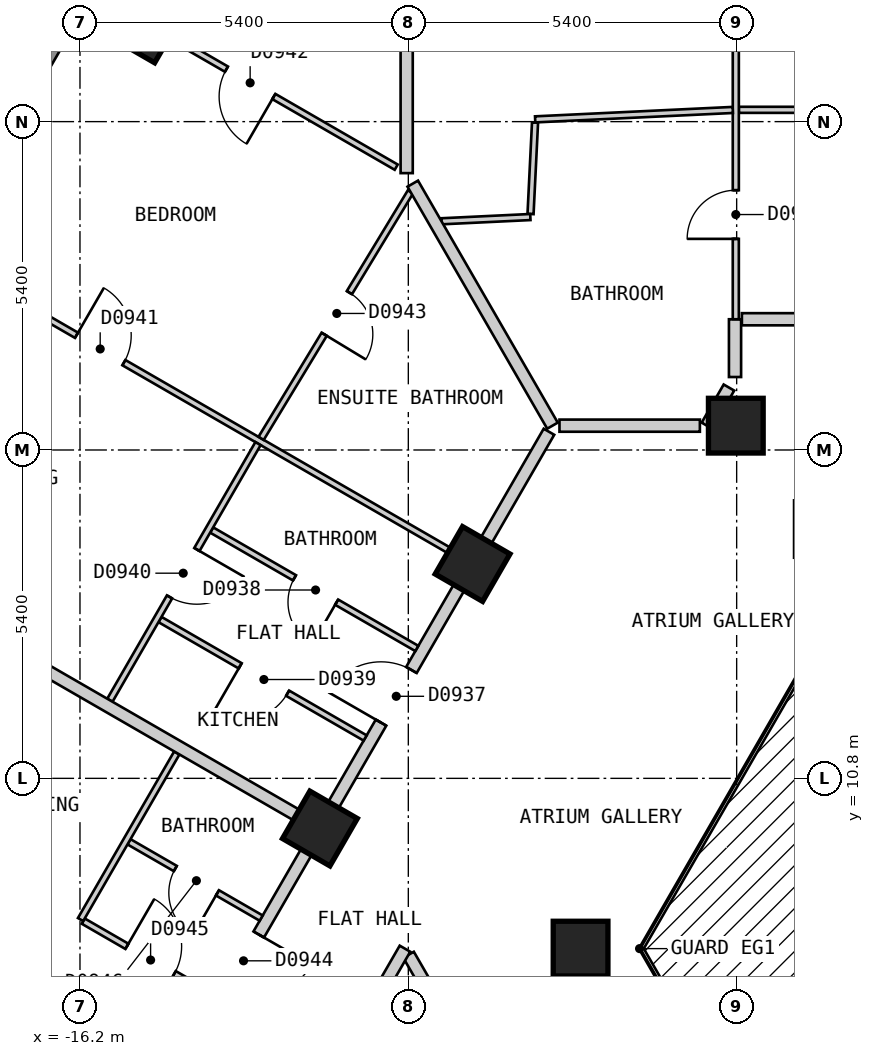
"""IFC4 building model, lengths in metres.
Left out: names, types, materials, properties, quantities, classifications, styles, units other than length and angle.
Written with IfcOpenShell. Run it as: python <this file> out.ifc"""

import sys

from ifc_helpers import new_model, si_unit, direction, frame, frame_2d, origin, origin_2d, place, context, subcontext, project, spatial, polyline, rectangle, outline, extrude, element, fill, save


model = new_model("IFC4")
c1 = context("Model", 3, precision=1e-05, world=origin(), true_north=direction((0.0, 1.0)))
c2 = subcontext(c1, "Body", "Model", "MODEL_VIEW")
j1 = project(units=[si_unit("LENGTHUNIT", "METRE"), si_unit("PLANEANGLEUNIT", "RADIAN")], contexts=[c1])
p1 = place(None, origin())
s1 = spatial("IfcSite", under=j1, at=p1, CompositionType="ELEMENT")
p2 = place(p1, origin())
s2 = spatial("IfcBuilding", under=s1, at=p2, CompositionType="ELEMENT")
p3 = place(p2, frame((0.0, 0.0, 90.0)))
s3 = spatial("IfcBuildingStorey", under=s2, at=p3, CompositionType="ELEMENT", Elevation=90.0)
p4 = place(p3, frame((-15.155, 23.251, 0.0), z_axis=(0.0, 0.0, 1.0), x_axis=(-0.5, -0.866025403784, 0.0)))
e1 = element("IfcColumn", 1, at=p4, inside=s3, PredefinedType="COLUMN", context=c2, shape_type="SweptSolid", body=[
    extrude(rectangle(XDim=1.0, YDim=1.0, at=origin_2d()), origin(), (0.0, 0.0, 1.0), 3.0),
])
for number, where, z_axis, x_axis in (
    (2, (-5.414, 16.6, 0.0), (0.0, 0.0, 1.0), (-1.0, 0.0, 0.0)),
    (3, (-9.743, 14.325, 0.0), (0.0, 0.0, 1.0), (-0.5, -0.866, 0.0)),
    (4, (-7.967, 8.0, 0.0), (0.0, 0.0, 1.0), (1.0, 0.0, 0.0)),
    (5, (-12.254, 9.975, 0.0), (0.0, 0.0, 1.0), (-0.5, -0.866, 0.0)),
):
    element("IfcColumn", number, at=place(p3, frame(where, z_axis=z_axis, x_axis=x_axis)), inside=s3, PredefinedType="COLUMN", context=c2, shape_type="SweptSolid", body=[
        extrude(rectangle(XDim=0.9, YDim=0.9, at=origin_2d()), origin(), (0.0, 0.0, 1.0), 3.0),
    ])
p5 = place(p3, frame((-15.747, 24.425, 0.0), z_axis=(0.0, 0.0, 1.0), x_axis=(-0.500027479704, -0.866009537788, 0.0)))
e6 = element("IfcWall", 6, at=p5, inside=s3, PredefinedType="SOLIDWALL", context=c2, shape_type="SweptSolid", body=[
    extrude(outline(polyline([(0.0, -0.15), (26.559, -0.15), (26.478, 0.15), (0.08, 0.15), (0.0, -0.15)])), origin(), (0.0, 0.0, 1.0), 2.7),
])
p6 = place(p5, frame((2.483, 0.0, 0.15)))
e7 = element("IfcOpeningElement", 7, at=p6, cuts=e6, PredefinedType="OPENING", context=c2, shape_type="SweptSolid", body=[
    extrude(rectangle(XDim=1.5, YDim=2.1, at=frame_2d((0.75, 1.05))), frame((0.0, 0.16, 0.0), z_axis=(0.0, -1.0, 0.0), x_axis=(1.0, 0.0, 0.0)), (0.0, 0.0, 1.0), 0.32),
])
p7 = place(p5, frame((7.506, 0.0, 0.15)))
e8 = element("IfcOpeningElement", 8, at=p7, cuts=e6, PredefinedType="OPENING", context=c2, shape_type="SweptSolid", body=[
    extrude(rectangle(XDim=1.5, YDim=2.1, at=frame_2d((0.75, 1.05))), frame((0.0, 0.16, 0.0), z_axis=(0.0, -1.0, 0.0), x_axis=(1.0, 0.0, 0.0)), (0.0, 0.0, 1.0), 0.32),
])
p8 = place(p5, frame((12.529, 0.0, 0.15)))
e9 = element("IfcOpeningElement", 9, at=p8, cuts=e6, PredefinedType="OPENING", context=c2, shape_type="SweptSolid", body=[
    extrude(rectangle(XDim=1.5, YDim=2.1, at=frame_2d((0.75, 1.05))), frame((0.0, 0.16, 0.0), z_axis=(0.0, -1.0, 0.0), x_axis=(1.0, 0.0, 0.0)), (0.0, 0.0, 1.0), 0.32),
])
p9 = place(p5, frame((17.552, 0.0, 0.15)))
e10 = element("IfcOpeningElement", 10, at=p9, cuts=e6, PredefinedType="OPENING", context=c2, shape_type="SweptSolid", body=[
    extrude(rectangle(XDim=1.5, YDim=2.1, at=frame_2d((0.75, 1.05))), frame((0.0, 0.16, 0.0), z_axis=(0.0, -1.0, 0.0), x_axis=(1.0, 0.0, 0.0)), (0.0, 0.0, 1.0), 0.32),
])
p10 = place(p5, frame((22.575, 0.0, 0.15)))
e11 = element("IfcOpeningElement", 11, at=p10, cuts=e6, PredefinedType="OPENING", context=c2, shape_type="SweptSolid", body=[
    extrude(rectangle(XDim=1.5, YDim=2.1, at=frame_2d((0.75, 1.05))), frame((0.0, 0.16, 0.0), z_axis=(0.0, -1.0, 0.0), x_axis=(1.0, 0.0, 0.0)), (0.0, 0.0, 1.0), 0.32),
])
p11 = place(p3, frame((-10.796, 7.899, 0.0), z_axis=(0.0, 0.0, 1.0), x_axis=(0.500010383074, -0.866019409031, 0.0)))
e12 = element("IfcWall", 12, at=p11, inside=s3, PredefinedType="PARTITIONING", context=c2, shape_type="SweptSolid", body=[
    extrude(rectangle(XDim=7.535, YDim=0.2, at=frame_2d((3.768, 0.0))), origin(), (0.0, 0.0, 1.0), 2.7),
])
p12 = place(p3, frame((-8.314, 16.6, 0.0), z_axis=(0.0, 0.0, 1.0), x_axis=(1.0, 0.0, 0.0)))
e13 = element("IfcWall", 13, at=p12, inside=s3, PredefinedType="PARTITIONING", context=c2, shape_type="SweptSolid", body=[
    extrude(rectangle(XDim=2.309, YDim=0.2, at=frame_2d((1.155, 0.0))), origin(), (0.0, 0.0, 1.0), 2.7),
])
p13 = place(p3, frame((-5.314, 18.35, 0.0), z_axis=(0.0, 0.0, 1.0), x_axis=(1.0, 0.0, 0.0)))
e14 = element("IfcWall", 14, at=p13, inside=s3, PredefinedType="PARTITIONING", context=c2, shape_type="SweptSolid", body=[
    extrude(rectangle(XDim=7.063, YDim=0.2, at=frame_2d((3.531, 0.0))), origin(), (0.0, 0.0, 1.0), 2.7),
])
p14 = place(p13, frame((2.106, 0.0, 0.0)))
e15 = element("IfcOpeningElement", 15, at=p14, cuts=e14, PredefinedType="OPENING", context=c2, shape_type="SweptSolid", body=[
    extrude(rectangle(XDim=1.0, YDim=2.1, at=frame_2d((0.5, 1.05))), frame((0.0, 0.11, 0.0), z_axis=(0.0, -1.0, 0.0), x_axis=(1.0, 0.0, 0.0)), (0.0, 0.0, 1.0), 0.22),
])
p15 = place(p3, frame((-16.05, -1.0, 0.0), z_axis=(0.0, 0.0, 1.0), x_axis=(0.499962449088, 0.866047082728, 0.0)))
e16 = element("IfcWall", 16, at=p15, inside=s3, PredefinedType="PARTITIONING", context=c2, shape_type="SweptSolid", body=[
    extrude(rectangle(XDim=10.391, YDim=0.2, at=frame_2d((5.195, 0.0))), origin(), (0.0, 0.0, 1.0), 2.7),
])
p16 = place(p15, frame((4.745, 0.0, 0.0)))
e17 = element("IfcOpeningElement", 17, at=p16, cuts=e16, PredefinedType="OPENING", context=c2, shape_type="SweptSolid", body=[
    extrude(rectangle(XDim=0.9, YDim=2.1, at=frame_2d((0.45, 1.05))), frame((0.0, 0.11, 0.0), z_axis=(0.0, -1.0, 0.0), x_axis=(1.0, 0.0, 0.0)), (0.0, 0.0, 1.0), 0.22),
])
p17 = place(p3, frame((-5.889, 16.6, 0.0), z_axis=(0.0, 0.0, 1.0), x_axis=(0.499839240638, 0.866118198353, 0.0)))
e18 = element("IfcWall", 18, at=p17, inside=s3, PredefinedType="PARTITIONING", context=c2, shape_type="SweptSolid", body=[
    extrude(rectangle(XDim=0.724, YDim=0.2, at=frame_2d((0.362, 0.0))), origin(), (0.0, 0.0, 1.0), 2.7),
])
p18 = place(p3, frame((-18.562, -0.951, 0.0), z_axis=(0.0, 0.0, 1.0), x_axis=(0.499987097491, 0.866032852923, 0.0)))
e19 = element("IfcWall", 19, at=p18, inside=s3, PredefinedType="PARTITIONING", context=c2, shape_type="SweptSolid", body=[
    extrude(rectangle(XDim=20.15, YDim=0.2, at=frame_2d((10.075, 0.0))), origin(), (0.0, 0.0, 1.0), 2.7),
])
p19 = place(p18, frame((14.627, 0.0, 0.0)))
e20 = element("IfcOpeningElement", 20, at=p19, cuts=e19, PredefinedType="OPENING", context=c2, shape_type="SweptSolid", body=[
    extrude(rectangle(XDim=1.0, YDim=2.1, at=frame_2d((0.5, 1.05))), frame((0.0, 0.11, 0.0), z_axis=(0.0, -1.0, 0.0), x_axis=(1.0, 0.0, 0.0)), (0.0, 0.0, 1.0), 0.22),
])
p20 = place(p18, frame((9.604, 0.0, 0.0)))
e21 = element("IfcOpeningElement", 21, at=p20, cuts=e19, PredefinedType="OPENING", context=c2, shape_type="SweptSolid", body=[
    extrude(rectangle(XDim=1.0, YDim=2.1, at=frame_2d((0.5, 1.05))), frame((0.0, 0.11, 0.0), z_axis=(0.0, -1.0, 0.0), x_axis=(1.0, 0.0, 0.0)), (0.0, 0.0, 1.0), 0.22),
])
p21 = place(p3, frame((-5.427, 17.4, 0.0), z_axis=(0.0, 0.0, 1.0), x_axis=(0.0, 1.0, 0.0)))
e22 = element("IfcWall", 22, at=p21, inside=s3, PredefinedType="PARTITIONING", context=c2, shape_type="SweptSolid", body=[
    extrude(rectangle(XDim=0.95, YDim=0.2, at=frame_2d((0.475, 0.0))), origin(), (0.0, 0.0, 1.0), 2.7),
])
p22 = place(p3, frame((-16.146, 8.452, 0.0), z_axis=(0.0, 0.0, 1.0), x_axis=(0.865983051302, -0.500073349477, 0.0)))
e23 = element("IfcWall", 23, at=p22, inside=s3, PredefinedType="PARTITIONING", context=c2, shape_type="SweptSolid", body=[
    extrude(rectangle(XDim=2.509, YDim=0.1, at=frame_2d((1.255, 0.0))), origin(), (0.0, 0.0, 1.0), 2.7),
])
p23 = place(p22, frame((0.829, 0.0, 0.0)))
e24 = element("IfcOpeningElement", 24, at=p23, cuts=e23, PredefinedType="OPENING", context=c2, shape_type="SweptSolid", body=[
    extrude(rectangle(XDim=0.9, YDim=2.1, at=frame_2d((0.45, 1.05))), frame((0.0, 0.06, 0.0), z_axis=(0.0, -1.0, 0.0), x_axis=(1.0, 0.0, 0.0)), (0.0, 0.0, 1.0), 0.12),
])
p24 = place(p3, frame((-23.513, 10.675, 0.0), z_axis=(0.0, 0.0, 1.0), x_axis=(0.866041268327, -0.499972520799, 0.0)))
e25 = element("IfcWall", 25, at=p24, inside=s3, PredefinedType="PARTITIONING", context=c2, shape_type="SweptSolid", body=[
    extrude(rectangle(XDim=10.0, YDim=0.1, at=frame_2d((5.0, 0.0))), origin(), (0.0, 0.0, 1.0), 2.7),
])
p25 = place(p24, frame((4.325, 0.0, 0.0)))
e26 = element("IfcOpeningElement", 26, at=p25, cuts=e25, PredefinedType="OPENING", context=c2, shape_type="SweptSolid", body=[
    extrude(rectangle(XDim=0.9, YDim=2.1, at=frame_2d((0.45, 1.05))), frame((0.0, 0.06, 0.0), z_axis=(0.0, -1.0, 0.0), x_axis=(1.0, 0.0, 0.0)), (0.0, 0.0, 1.0), 0.12),
])
p26 = place(p3, frame((-14.884, 13.412, 0.0), z_axis=(0.0, 0.0, 1.0), x_axis=(0.866024880635, -0.500000906121, 0.0)))
e27 = element("IfcWall", 27, at=p26, inside=s3, PredefinedType="PARTITIONING", context=c2, shape_type="SweptSolid", body=[
    extrude(rectangle(XDim=3.896, YDim=0.1, at=frame_2d((1.948, 0.0))), origin(), (0.0, 0.0, 1.0), 2.7),
])
p27 = place(p26, frame((1.523, 0.0, 0.0)))
e28 = element("IfcOpeningElement", 28, at=p27, cuts=e27, PredefinedType="OPENING", context=c2, shape_type="SweptSolid", body=[
    extrude(rectangle(XDim=0.9, YDim=2.1, at=frame_2d((0.45, 1.05))), frame((0.0, 0.06, 0.0), z_axis=(0.0, -1.0, 0.0), x_axis=(1.0, 0.0, 0.0)), (0.0, 0.0, 1.0), 0.12),
])
p28 = place(p3, frame((-14.034, 14.884, 0.0), z_axis=(0.0, 0.0, 1.0), x_axis=(0.866024880635, -0.500000906121, 0.0)))
e29 = element("IfcWall", 29, at=p28, inside=s3, PredefinedType="PARTITIONING", context=c2, shape_type="SweptSolid", body=[
    extrude(rectangle(XDim=3.896, YDim=0.1, at=frame_2d((1.948, 0.0))), origin(), (0.0, 0.0, 1.0), 2.7),
])
p29 = place(p28, frame((1.573, 0.0, 0.0)))
e30 = element("IfcOpeningElement", 30, at=p29, cuts=e29, PredefinedType="OPENING", context=c2, shape_type="SweptSolid", body=[
    extrude(rectangle(XDim=0.8, YDim=2.1, at=frame_2d((0.4, 1.05))), frame((0.0, 0.06, 0.0), z_axis=(0.0, -1.0, 0.0), x_axis=(1.0, 0.0, 0.0)), (0.0, 0.0, 1.0), 0.12),
])
p30 = place(p3, frame((-15.394, 9.757, 0.0), z_axis=(0.0, 0.0, 1.0), x_axis=(0.866038211682, -0.499977815414, 0.0)))
e31 = element("IfcWall", 31, at=p30, inside=s3, PredefinedType="PARTITIONING", context=c2, shape_type="SweptSolid", body=[
    extrude(rectangle(XDim=2.51, YDim=0.1, at=frame_2d((1.255, 0.0))), origin(), (0.0, 0.0, 1.0), 2.7),
])
p31 = place(p30, frame((0.88, 0.0, 0.0)))
e32 = element("IfcOpeningElement", 32, at=p31, cuts=e31, PredefinedType="OPENING", context=c2, shape_type="SweptSolid", body=[
    extrude(rectangle(XDim=0.8, YDim=2.1, at=frame_2d((0.4, 1.05))), frame((0.0, 0.06, 0.0), z_axis=(0.0, -1.0, 0.0), x_axis=(1.0, 0.0, 0.0)), (0.0, 0.0, 1.0), 0.12),
])
p32 = place(p3, frame((-18.489, 19.375, 0.0), z_axis=(0.0, 0.0, 1.0), x_axis=(0.866016855193, -0.500014806302, 0.0)))
e33 = element("IfcWall", 33, at=p32, inside=s3, PredefinedType="PARTITIONING", context=c2, shape_type="SweptSolid", body=[
    extrude(rectangle(XDim=10.0, YDim=0.1, at=frame_2d((5.0, 0.0))), origin(), (0.0, 0.0, 1.0), 2.7),
])
p33 = place(p32, frame((2.577, 0.0, 0.0)))
e34 = element("IfcOpeningElement", 34, at=p33, cuts=e33, PredefinedType="OPENING", context=c2, shape_type="SweptSolid", body=[
    extrude(rectangle(XDim=0.9, YDim=2.1, at=frame_2d((0.45, 1.05))), frame((0.0, 0.06, 0.0), z_axis=(0.0, -1.0, 0.0), x_axis=(1.0, 0.0, 0.0)), (0.0, 0.0, 1.0), 0.12),
])
p34 = place(p3, frame((-15.977, 23.725, 0.0), z_axis=(0.0, 0.0, 1.0), x_axis=(0.866028566888, -0.499994521305, 0.0)))
e35 = element("IfcWall", 35, at=p34, inside=s3, PredefinedType="PARTITIONING", context=c2, shape_type="SweptSolid", body=[
    extrude(rectangle(XDim=5.748, YDim=0.1, at=frame_2d((2.874, 0.0))), origin(), (0.0, 0.0, 1.0), 2.7),
])
p35 = place(p34, frame((2.524, 0.0, 0.0)))
e36 = element("IfcOpeningElement", 36, at=p35, cuts=e35, PredefinedType="OPENING", context=c2, shape_type="SweptSolid", body=[
    extrude(rectangle(XDim=0.9, YDim=2.1, at=frame_2d((0.45, 1.05))), frame((0.0, 0.06, 0.0), z_axis=(0.0, -1.0, 0.0), x_axis=(1.0, 0.0, 0.0)), (0.0, 0.0, 1.0), 0.12),
])
p36 = place(p3, frame((-5.364, 21.794, 0.0), z_axis=(0.0, 0.0, 1.0), x_axis=(1.0, 0.0, 0.0)))
e37 = element("IfcWall", 37, at=p36, inside=s3, PredefinedType="PARTITIONING", context=c2, shape_type="SweptSolid", body=[
    extrude(rectangle(XDim=5.313, YDim=0.1, at=frame_2d((2.656, 0.0))), origin(), (0.0, 0.0, 1.0), 2.7),
])
p37 = place(p36, frame((2.207, 0.0, 0.0)))
e38 = element("IfcOpeningElement", 38, at=p37, cuts=e37, PredefinedType="OPENING", context=c2, shape_type="SweptSolid", body=[
    extrude(rectangle(XDim=0.9, YDim=2.1, at=frame_2d((0.45, 1.05))), frame((0.0, 0.06, 0.0), z_axis=(0.0, -1.0, 0.0), x_axis=(1.0, 0.0, 0.0)), (0.0, 0.0, 1.0), 0.12),
])
p38 = place(p3, frame((-13.221, 16.391, 0.0), z_axis=(0.0, 0.0, 1.0), x_axis=(0.518164725284, 0.855280841286, 0.0)))
e39 = element("IfcWall", 39, at=p38, inside=s3, PredefinedType="PARTITIONING", context=c2, shape_type="SweptSolid", body=[
    extrude(rectangle(XDim=4.74, YDim=0.1, at=frame_2d((2.37, 0.0))), origin(), (0.0, 0.0, 1.0), 2.7),
])
p39 = place(p38, frame((2.002, 0.0, 0.0)))
e40 = element("IfcOpeningElement", 40, at=p39, cuts=e39, PredefinedType="OPENING", context=c2, shape_type="SweptSolid", body=[
    extrude(rectangle(XDim=0.8, YDim=2.1, at=frame_2d((0.4, 1.05))), frame((0.0, 0.06, 0.0), z_axis=(0.0, -1.0, 0.0), x_axis=(1.0, 0.0, 0.0)), (0.0, 0.0, 1.0), 0.12),
])
p40 = place(p3, frame((-16.19, 8.478, 0.0), z_axis=(0.0, 0.0, 1.0), x_axis=(0.500156715107, 0.865934905367, 0.0)))
e41 = element("IfcWall", 41, at=p40, inside=s3, PredefinedType="PARTITIONING", context=c2, shape_type="SweptSolid", body=[
    extrude(rectangle(XDim=3.163, YDim=0.1, at=frame_2d((1.582, 0.0))), origin(), (0.0, 0.0, 1.0), 2.7),
])
p41 = place(p3, frame((-15.708, 12.085, 0.0), z_axis=(0.0, 0.0, 1.0), x_axis=(0.499943653708, 0.866057932887, 0.0)))
e42 = element("IfcWall", 42, at=p41, inside=s3, PredefinedType="PARTITIONING", context=c2, shape_type="SweptSolid", body=[
    extrude(rectangle(XDim=4.873, YDim=0.1, at=frame_2d((2.436, 0.0))), origin(), (0.0, 0.0, 1.0), 2.7),
])
p42 = place(p41, frame((1.962, 0.0, 0.0)))
e43 = element("IfcOpeningElement", 43, at=p42, cuts=e42, PredefinedType="OPENING", context=c2, shape_type="SweptSolid", body=[
    extrude(rectangle(XDim=0.9, YDim=2.1, at=frame_2d((0.45, 1.05))), frame((0.0, 0.06, 0.0), z_axis=(0.0, -1.0, 0.0), x_axis=(1.0, 0.0, 0.0)), (0.0, 0.0, 1.0), 0.12),
])
p43 = place(p3, frame((-8.79, 20.081, 0.0), z_axis=(0.0, 0.0, 1.0), x_axis=(0.049097109821, 0.998794009697, 0.0)))
e44 = element("IfcWall", 44, at=p43, inside=s3, PredefinedType="PARTITIONING", context=c2, shape_type="SweptSolid", body=[
    extrude(rectangle(XDim=1.507, YDim=0.1, at=frame_2d((0.753, 0.0))), origin(), (0.0, 0.0, 1.0), 2.7),
])
p44 = place(p3, frame((-5.414, 18.35, 0.0), z_axis=(0.0, 0.0, 1.0), x_axis=(0.0, 1.0, 0.0)))
e45 = element("IfcWall", 45, at=p44, inside=s3, PredefinedType="PARTITIONING", context=c2, shape_type="SweptSolid", body=[
    extrude(rectangle(XDim=8.35, YDim=0.1, at=frame_2d((4.175, 0.0))), origin(), (0.0, 0.0, 1.0), 2.7),
])
p45 = place(p44, frame((1.322, 0.0, 0.0)))
e46 = element("IfcOpeningElement", 46, at=p45, cuts=e45, PredefinedType="OPENING", context=c2, shape_type="SweptSolid", body=[
    extrude(rectangle(XDim=0.8, YDim=2.1, at=frame_2d((0.4, 1.05))), frame((0.0, 0.06, 0.0), z_axis=(0.0, -1.0, 0.0), x_axis=(1.0, 0.0, 0.0)), (0.0, 0.0, 1.0), 0.12),
])
p46 = place(p44, frame((5.447, 0.0, 0.0)))
e47 = element("IfcOpeningElement", 47, at=p46, cuts=e45, PredefinedType="OPENING", context=c2, shape_type="SweptSolid", body=[
    extrude(rectangle(XDim=0.9, YDim=2.1, at=frame_2d((0.45, 1.05))), frame((0.0, 0.06, 0.0), z_axis=(0.0, -1.0, 0.0), x_axis=(1.0, 0.0, 0.0)), (0.0, 0.0, 1.0), 0.12),
])
p47 = place(p3, frame((-10.254, 19.961, 0.0), z_axis=(0.0, 0.0, 1.0), x_axis=(0.998851840647, 0.047906162812, 0.0)))
e48 = element("IfcWall", 48, at=p47, inside=s3, PredefinedType="PARTITIONING", context=c2, shape_type="SweptSolid", body=[
    extrude(rectangle(XDim=1.463, YDim=0.1, at=frame_2d((0.731, 0.0))), origin(), (0.0, 0.0, 1.0), 2.7),
])
p48 = place(p3, frame((-8.714, 21.637, 0.0), z_axis=(0.0, 0.0, 1.0), x_axis=(0.998864229829, 0.047647144377, 0.0)))
e49 = element("IfcWall", 49, at=p48, inside=s3, PredefinedType="PARTITIONING", context=c2, shape_type="SweptSolid", body=[
    extrude(rectangle(XDim=3.254, YDim=0.1, at=frame_2d((1.627, 0.0))), origin(), (0.0, 0.0, 1.0), 2.7),
])
p49 = place(p3, frame((-10.727, 20.58, 0.0), z_axis=(0.0, 0.0, 1.0), x_axis=(0.500041272028, -0.866001574057, 0.0)))
e50 = element("IfcWall", 50, at=p49, inside=s3, PredefinedType="PARTITIONING", context=c2, shape_type="SweptSolid", body=[
    extrude(rectangle(XDim=4.596, YDim=0.2, at=frame_2d((2.298, 0.0))), origin(), (0.0, 0.0, 1.0), 2.7),
])
p50 = place(p3, frame((-21.001, 15.025, 0.0), z_axis=(0.0, 0.0, 1.0), x_axis=(0.866016855193, -0.500014806302, 0.0)))
e51 = element("IfcWall", 51, at=p50, inside=s3, PredefinedType="PARTITIONING", context=c2, shape_type="SweptSolid", body=[
    extrude(rectangle(XDim=10.0, YDim=0.2, at=frame_2d((5.0, 0.0))), origin(), (0.0, 0.0, 1.0), 2.7),
])
p51 = place(p3, frame((-10.827, 20.753, 0.0), z_axis=(0.0, 0.0, 1.0), x_axis=(0.0, 1.0, 0.0)))
e52 = element("IfcWall", 52, at=p51, inside=s3, PredefinedType="PARTITIONING", context=c2, shape_type="SweptSolid", body=[
    extrude(rectangle(XDim=5.947, YDim=0.2, at=frame_2d((2.974, 0.0))), origin(), (0.0, 0.0, 1.0), 2.7),
])
p52 = place(p45, origin())
e53 = element("IfcDoor", 53, at=p52, inside=s3, OperationType="SINGLE_SWING_LEFT", PredefinedType="DOOR", context=c2, shape_type="SweptSolid", body=[
    extrude(rectangle(XDim=0.8, YDim=2.1, at=frame_2d((0.4, 1.05))), frame((0.0, 0.025, 0.0), z_axis=(0.0, -1.0, 0.0), x_axis=(1.0, 0.0, 0.0)), (0.0, 0.0, 1.0), 0.05),
])
fill(e46, e53)
p53 = place(p19, origin())
e54 = element("IfcDoor", 54, at=p53, inside=s3, OperationType="SINGLE_SWING_LEFT", PredefinedType="DOOR", context=c2, shape_type="SweptSolid", body=[
    extrude(rectangle(XDim=1.0, YDim=2.1, at=frame_2d((0.5, 1.05))), frame((0.0, 0.025, 0.0), z_axis=(0.0, -1.0, 0.0), x_axis=(1.0, 0.0, 0.0)), (0.0, 0.0, 1.0), 0.05),
])
fill(e20, e54)
p54 = place(p29, origin())
e55 = element("IfcDoor", 55, at=p54, inside=s3, OperationType="SINGLE_SWING_RIGHT", PredefinedType="DOOR", context=c2, shape_type="SweptSolid", body=[
    extrude(rectangle(XDim=0.8, YDim=2.1, at=frame_2d((0.4, 1.05))), frame((0.0, 0.025, 0.0), z_axis=(0.0, -1.0, 0.0), x_axis=(1.0, 0.0, 0.0)), (0.0, 0.0, 1.0), 0.05),
])
fill(e30, e55)
p55 = place(p27, origin())
e56 = element("IfcDoor", 56, at=p55, inside=s3, OperationType="SINGLE_SWING_LEFT", PredefinedType="DOOR", context=c2, shape_type="SweptSolid", body=[
    extrude(rectangle(XDim=0.9, YDim=2.1, at=frame_2d((0.45, 1.05))), frame((0.0, 0.025, 0.0), z_axis=(0.0, -1.0, 0.0), x_axis=(1.0, 0.0, 0.0)), (0.0, 0.0, 1.0), 0.05),
])
fill(e28, e56)
p56 = place(p42, origin())
e57 = element("IfcDoor", 57, at=p56, inside=s3, OperationType="SINGLE_SWING_RIGHT", PredefinedType="DOOR", context=c2, shape_type="SweptSolid", body=[
    extrude(rectangle(XDim=0.9, YDim=2.1, at=frame_2d((0.45, 1.05))), frame((0.0, 0.025, 0.0), z_axis=(0.0, -1.0, 0.0), x_axis=(1.0, 0.0, 0.0)), (0.0, 0.0, 1.0), 0.05),
])
fill(e43, e57)
p57 = place(p33, origin())
e58 = element("IfcDoor", 58, at=p57, inside=s3, OperationType="SINGLE_SWING_LEFT", PredefinedType="DOOR", context=c2, shape_type="SweptSolid", body=[
    extrude(rectangle(XDim=0.9, YDim=2.1, at=frame_2d((0.45, 1.05))), frame((0.0, 0.025, 0.0), z_axis=(0.0, -1.0, 0.0), x_axis=(1.0, 0.0, 0.0)), (0.0, 0.0, 1.0), 0.05),
])
fill(e34, e58)
p58 = place(p35, origin())
e59 = element("IfcDoor", 59, at=p58, inside=s3, OperationType="SINGLE_SWING_RIGHT", PredefinedType="DOOR", context=c2, shape_type="SweptSolid", body=[
    extrude(rectangle(XDim=0.9, YDim=2.1, at=frame_2d((0.45, 1.05))), frame((0.0, 0.025, 0.0), z_axis=(0.0, -1.0, 0.0), x_axis=(1.0, 0.0, 0.0)), (0.0, 0.0, 1.0), 0.05),
])
fill(e36, e59)
p59 = place(p39, origin())
e60 = element("IfcDoor", 60, at=p59, inside=s3, OperationType="SINGLE_SWING_LEFT", PredefinedType="DOOR", context=c2, shape_type="SweptSolid", body=[
    extrude(rectangle(XDim=0.8, YDim=2.1, at=frame_2d((0.4, 1.05))), frame((0.0, 0.025, 0.0), z_axis=(0.0, -1.0, 0.0), x_axis=(1.0, 0.0, 0.0)), (0.0, 0.0, 1.0), 0.05),
])
fill(e40, e60)
p60 = place(p20, origin())
e61 = element("IfcDoor", 61, at=p60, inside=s3, OperationType="SINGLE_SWING_RIGHT", PredefinedType="DOOR", context=c2, shape_type="SweptSolid", body=[
    extrude(rectangle(XDim=1.0, YDim=2.1, at=frame_2d((0.5, 1.05))), frame((0.0, 0.025, 0.0), z_axis=(0.0, -1.0, 0.0), x_axis=(1.0, 0.0, 0.0)), (0.0, 0.0, 1.0), 0.05),
])
fill(e21, e61)
p61 = place(p23, origin())
e62 = element("IfcDoor", 62, at=p61, inside=s3, OperationType="SINGLE_SWING_LEFT", PredefinedType="DOOR", context=c2, shape_type="SweptSolid", body=[
    extrude(rectangle(XDim=0.9, YDim=2.1, at=frame_2d((0.45, 1.05))), frame((0.0, 0.025, 0.0), z_axis=(0.0, -1.0, 0.0), x_axis=(1.0, 0.0, 0.0)), (0.0, 0.0, 1.0), 0.05),
])
fill(e24, e62)
p62 = place(p31, origin())
e63 = element("IfcDoor", 63, at=p62, inside=s3, OperationType="SINGLE_SWING_RIGHT", PredefinedType="DOOR", context=c2, shape_type="SweptSolid", body=[
    extrude(rectangle(XDim=0.8, YDim=2.1, at=frame_2d((0.4, 1.05))), frame((0.0, 0.025, 0.0), z_axis=(0.0, -1.0, 0.0), x_axis=(1.0, 0.0, 0.0)), (0.0, 0.0, 1.0), 0.05),
])
fill(e32, e63)
save(model, sys.argv[1])
